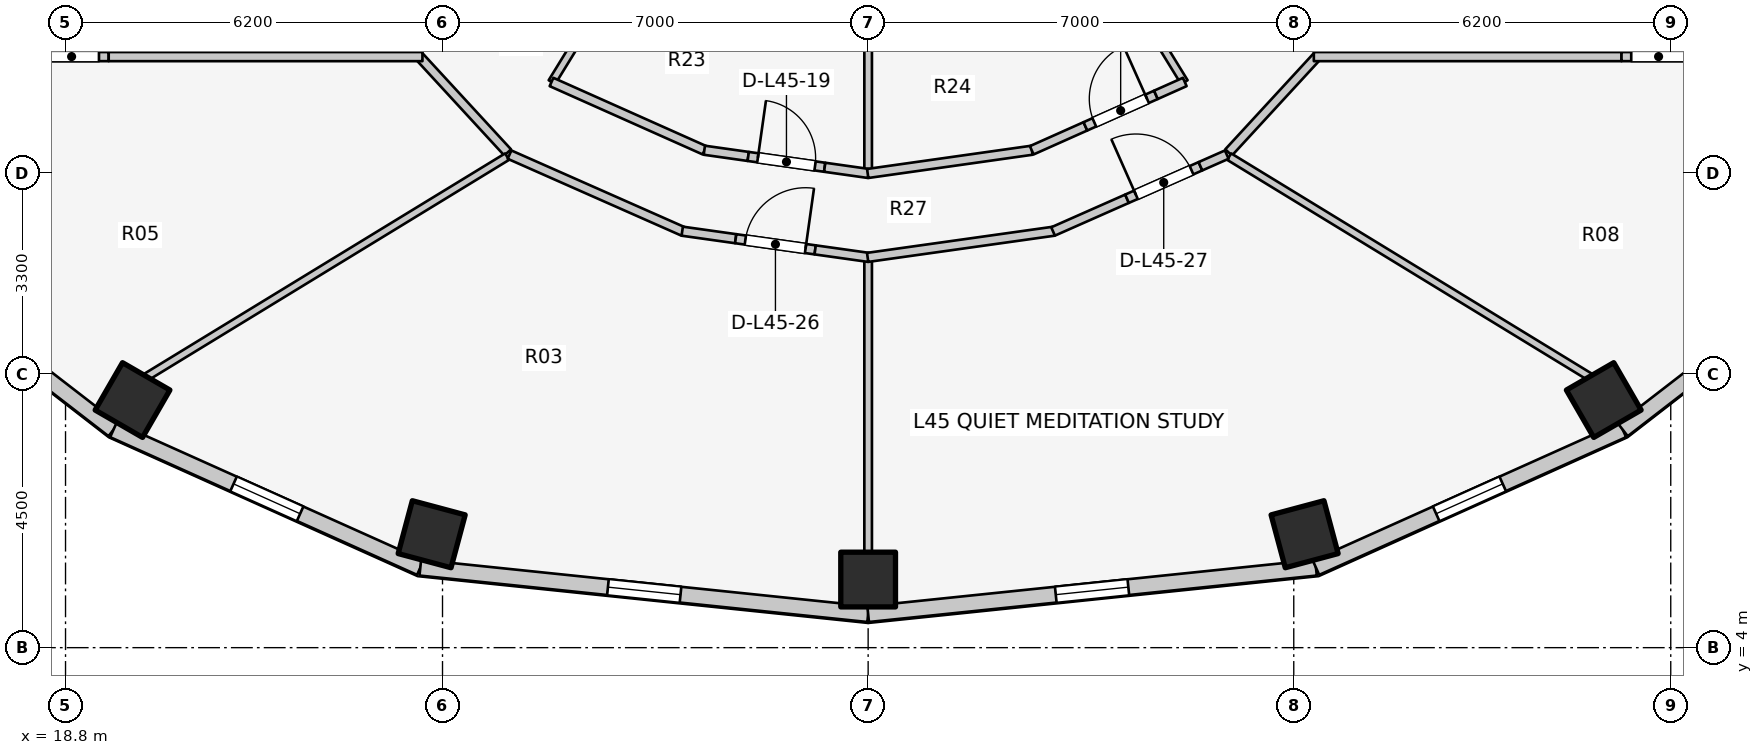
"""IFC4 building model, lengths in metres.
Left out: names, types, materials, properties, quantities, classifications, styles, units other than length and angle.
Written with IfcOpenShell. Run it as: python <this file> out.ifc"""

import sys

from ifc_helpers import new_model, si_unit, direction, frame, frame_2d, origin, origin_2d, place, context, subcontext, project, spatial, rectangle, extrude, element, fill, save


model = new_model("IFC4")
c1 = context("Model", 3, precision=1e-05, world=origin(), true_north=direction((0.0, 1.0)))
c2 = subcontext(c1, "Body", "Model", "MODEL_VIEW")
j1 = project(units=[si_unit("LENGTHUNIT", "METRE"), si_unit("PLANEANGLEUNIT", "RADIAN")], contexts=[c1])
p1 = place(None, origin())
s1 = spatial("IfcSite", under=j1, at=p1, CompositionType="ELEMENT")
p2 = place(p1, origin())
s2 = spatial("IfcBuilding", under=s1, at=p2, CompositionType="ELEMENT")
p3 = place(p2, frame((0.0, 0.0, 149.8)))
s3 = spatial("IfcBuildingStorey", under=s2, at=p3, CompositionType="ELEMENT", Elevation=149.8)
for number, where, z_axis, x_axis in (
    (1, (19.902, 8.072, 0.0), (0.0, 0.0, 1.0), (-0.5, -0.866, 0.0)),
    (2, (24.822, 5.865, 0.0), (0.0, 0.0, 1.0), (-0.259, -0.966, 0.0)),
    (3, (32.0, 5.12, 0.0), (0.0, 0.0, 1.0), (0.0, -1.0, 0.0)),
    (4, (39.178, 5.865, 0.0), (0.0, 0.0, 1.0), (0.259, -0.966, 0.0)),
    (5, (44.098, 8.072, 0.0), (0.0, 0.0, 1.0), (0.5, -0.866, 0.0)),
):
    element("IfcColumn", number, at=place(p3, frame(where, z_axis=z_axis, x_axis=x_axis)), inside=s3, PredefinedType="COLUMN", context=c2, shape_type="SweptSolid", body=[
        extrude(rectangle(XDim=0.9, YDim=0.9, at=origin_2d()), origin(), (0.0, 0.0, 1.0), 3.1),
    ])
p4 = place(p3, frame((15.731, 10.559, 0.0), z_axis=(0.0, 0.0, 1.0), x_axis=(0.791460185804, -0.611220724687, 0.0)))
e6 = element("IfcWall", 6, at=p4, inside=s3, PredefinedType="STANDARD", context=c2, shape_type="SweptSolid", body=[
    extrude(rectangle(XDim=4.872, YDim=0.26, at=frame_2d((2.436, 0.0))), origin(), (0.0, 0.0, 1.0), 1.22),
])
p5 = place(p3, frame((19.587, 7.581, 0.0), z_axis=(0.0, 0.0, 1.0), x_axis=(0.912353637112, -0.409403029847, 0.0)))
e7 = element("IfcWall", 7, at=p5, inside=s3, PredefinedType="STANDARD", context=c2, shape_type="SweptSolid", body=[
    extrude(rectangle(XDim=5.533, YDim=0.26, at=frame_2d((2.766, 0.0))), origin(), (0.0, 0.0, 1.0), 1.22),
])
p6 = place(p5, frame((2.167, 0.0, 0.15)))
e8 = element("IfcOpeningElement", 8, at=p6, cuts=e7, PredefinedType="OPENING", context=c2, shape_type="SweptSolid", body=[
    extrude(rectangle(XDim=1.2, YDim=0.9, at=frame_2d((0.6, 0.45))), frame((0.0, 0.14, 0.0), z_axis=(0.0, -1.0, 0.0), x_axis=(1.0, 0.0, 0.0)), (0.0, 0.0, 1.0), 0.28),
])
p7 = place(p3, frame((24.635, 5.315, 0.0), z_axis=(0.0, 0.0, 1.0), x_axis=(0.994664178965, -0.10316574569, 0.0)))
e9 = element("IfcWall", 9, at=p7, inside=s3, PredefinedType="STANDARD", context=c2, shape_type="SweptSolid", body=[
    extrude(rectangle(XDim=7.405, YDim=0.26, at=frame_2d((3.702, 0.0))), origin(), (0.0, 0.0, 1.0), 1.22),
])
p8 = place(p7, frame((3.102, 0.0, 0.15)))
e10 = element("IfcOpeningElement", 10, at=p8, cuts=e9, PredefinedType="OPENING", context=c2, shape_type="SweptSolid", body=[
    extrude(rectangle(XDim=1.2, YDim=0.9, at=frame_2d((0.6, 0.45))), frame((0.0, 0.14, 0.0), z_axis=(0.0, -1.0, 0.0), x_axis=(1.0, 0.0, 0.0)), (0.0, 0.0, 1.0), 0.28),
])
p9 = place(p3, frame((32.0, 4.552, 0.0), z_axis=(0.0, 0.0, 1.0), x_axis=(0.994664178965, 0.10316574569, 0.0)))
e11 = element("IfcWall", 11, at=p9, inside=s3, PredefinedType="STANDARD", context=c2, shape_type="SweptSolid", body=[
    extrude(rectangle(XDim=7.405, YDim=0.26, at=frame_2d((3.702, 0.0))), origin(), (0.0, 0.0, 1.0), 1.22),
])
p10 = place(p9, frame((3.102, 0.0, 0.15)))
e12 = element("IfcOpeningElement", 12, at=p10, cuts=e11, PredefinedType="OPENING", context=c2, shape_type="SweptSolid", body=[
    extrude(rectangle(XDim=1.2, YDim=0.9, at=frame_2d((0.6, 0.45))), frame((0.0, 0.14, 0.0), z_axis=(0.0, -1.0, 0.0), x_axis=(1.0, 0.0, 0.0)), (0.0, 0.0, 1.0), 0.28),
])
p11 = place(p3, frame((39.365, 5.315, 0.0), z_axis=(0.0, 0.0, 1.0), x_axis=(0.912353637112, 0.409403029847, 0.0)))
e13 = element("IfcWall", 13, at=p11, inside=s3, PredefinedType="STANDARD", context=c2, shape_type="SweptSolid", body=[
    extrude(rectangle(XDim=5.533, YDim=0.26, at=frame_2d((2.766, 0.0))), origin(), (0.0, 0.0, 1.0), 1.22),
])
p12 = place(p11, frame((2.167, 0.0, 0.15)))
e14 = element("IfcOpeningElement", 14, at=p12, cuts=e13, PredefinedType="OPENING", context=c2, shape_type="SweptSolid", body=[
    extrude(rectangle(XDim=1.2, YDim=0.9, at=frame_2d((0.6, 0.45))), frame((0.0, 0.14, 0.0), z_axis=(0.0, -1.0, 0.0), x_axis=(1.0, 0.0, 0.0)), (0.0, 0.0, 1.0), 0.28),
])
p13 = place(p3, frame((44.413, 7.581, 0.0), z_axis=(0.0, 0.0, 1.0), x_axis=(0.791460185804, 0.611220724687, 0.0)))
e15 = element("IfcWall", 15, at=p13, inside=s3, PredefinedType="STANDARD", context=c2, shape_type="SweptSolid", body=[
    extrude(rectangle(XDim=4.872, YDim=0.26, at=frame_2d((2.436, 0.0))), origin(), (0.0, 0.0, 1.0), 1.22),
])
p14 = place(p3, frame((26.072, 12.144, 0.0), z_axis=(0.0, 0.0, 1.0), x_axis=(-0.677579737957, 0.735449317567, 0.0)))
e16 = element("IfcWall", 16, at=p14, inside=s3, PredefinedType="PARTITIONING", context=c2, shape_type="SweptSolid", body=[
    extrude(rectangle(XDim=2.173, YDim=0.15, at=frame_2d((1.086, 0.0))), origin(), (0.0, 0.0, 1.0), 1.22),
])
p15 = place(p3, frame((18.29, 13.72, 0.0), z_axis=(0.0, 0.0, 1.0), x_axis=(1.0, 0.0, 0.0)))
e17 = element("IfcWall", 17, at=p15, inside=s3, PredefinedType="PARTITIONING", context=c2, shape_type="SweptSolid", body=[
    extrude(rectangle(XDim=1.22, YDim=0.15, at=frame_2d((0.61, 0.0))), origin(), (0.0, 0.0, 1.0), 2.575),
])
p16 = place(p15, frame((0.16, 0.0, 0.0)))
e18 = element("IfcOpeningElement", 18, at=p16, cuts=e17, PredefinedType="OPENING", context=c2, shape_type="SweptSolid", body=[
    extrude(rectangle(XDim=0.9, YDim=2.1, at=frame_2d((0.45, 1.05))), frame((0.0, 0.085, 0.0), z_axis=(0.0, -1.0, 0.0), x_axis=(1.0, 0.0, 0.0)), (0.0, 0.0, 1.0), 0.17),
])
p17 = place(p3, frame((19.51, 13.72, 0.0), z_axis=(0.0, 0.0, 1.0), x_axis=(1.0, 0.0, 0.0)))
e19 = element("IfcWall", 19, at=p17, inside=s3, PredefinedType="PARTITIONING", context=c2, shape_type="SweptSolid", body=[
    extrude(rectangle(XDim=5.16, YDim=0.15, at=frame_2d((2.58, 0.0))), origin(), (0.0, 0.0, 1.0), 1.22),
])
p18 = place(p3, frame((37.928, 12.144, 0.0), z_axis=(0.0, 0.0, 1.0), x_axis=(0.677579737957, 0.735449317567, 0.0)))
e20 = element("IfcWall", 20, at=p18, inside=s3, PredefinedType="PARTITIONING", context=c2, shape_type="SweptSolid", body=[
    extrude(rectangle(XDim=2.173, YDim=0.15, at=frame_2d((1.086, 0.0))), origin(), (0.0, 0.0, 1.0), 1.22),
])
p19 = place(p3, frame((39.33, 13.72, 0.0), z_axis=(0.0, 0.0, 1.0), x_axis=(1.0, 0.0, 0.0)))
e21 = element("IfcWall", 21, at=p19, inside=s3, PredefinedType="PARTITIONING", context=c2, shape_type="SweptSolid", body=[
    extrude(rectangle(XDim=5.06, YDim=0.15, at=frame_2d((2.53, 0.0))), origin(), (0.0, 0.0, 1.0), 1.22),
])
p20 = place(p3, frame((44.39, 13.72, 0.0), z_axis=(0.0, 0.0, 1.0), x_axis=(1.0, 0.0, 0.0)))
e22 = element("IfcWall", 22, at=p20, inside=s3, PredefinedType="PARTITIONING", context=c2, shape_type="SweptSolid", body=[
    extrude(rectangle(XDim=1.22, YDim=0.15, at=frame_2d((0.61, 0.0))), origin(), (0.0, 0.0, 1.0), 2.575),
])
p21 = place(p20, frame((0.16, 0.0, 0.0)))
e23 = element("IfcOpeningElement", 23, at=p21, cuts=e22, PredefinedType="OPENING", context=c2, shape_type="SweptSolid", body=[
    extrude(rectangle(XDim=0.9, YDim=2.1, at=frame_2d((0.45, 1.05))), frame((0.0, 0.085, 0.0), z_axis=(0.0, -1.0, 0.0), x_axis=(1.0, 0.0, 0.0)), (0.0, 0.0, 1.0), 0.17),
])
p22 = place(p3, frame((28.45, 15.985, 0.0), z_axis=(0.0, 0.0, 1.0), x_axis=(-0.523587550846, -0.851971875474, 0.0)))
e24 = element("IfcWall", 24, at=p22, inside=s3, PredefinedType="PARTITIONING", context=c2, shape_type="SweptSolid", body=[
    extrude(rectangle(XDim=3.153, YDim=0.125, at=frame_2d((1.577, 0.0))), origin(), (0.0, 0.0, 1.0), 1.22),
])
p23 = place(p3, frame((32.0, 14.9, 0.0), z_axis=(0.0, 0.0, 1.0), x_axis=(0.0, -1.0, 0.0)))
e25 = element("IfcWall", 25, at=p23, inside=s3, PredefinedType="PARTITIONING", context=c2, shape_type="SweptSolid", body=[
    extrude(rectangle(XDim=3.102, YDim=0.125, at=frame_2d((1.551, 0.0))), origin(), (0.0, 0.0, 1.0), 1.22),
])
p24 = place(p3, frame((35.55, 15.985, 0.0), z_axis=(0.0, 0.0, 1.0), x_axis=(0.523587550846, -0.851971875474, 0.0)))
e26 = element("IfcWall", 26, at=p24, inside=s3, PredefinedType="PARTITIONING", context=c2, shape_type="SweptSolid", body=[
    extrude(rectangle(XDim=3.153, YDim=0.125, at=frame_2d((1.577, 0.0))), origin(), (0.0, 0.0, 1.0), 1.22),
])
p25 = place(p3, frame((26.793, 13.303, 0.0), z_axis=(0.0, 0.0, 1.0), x_axis=(0.913145536541, -0.407633694749, 0.0)))
e27 = element("IfcWall", 27, at=p25, inside=s3, PredefinedType="PARTITIONING", context=c2, shape_type="SweptSolid", body=[
    extrude(rectangle(XDim=2.756, YDim=0.15, at=frame_2d((1.378, 0.0))), origin(), (0.0, 0.0, 1.0), 1.22),
])
p26 = place(p3, frame((29.306, 12.18, 0.0), z_axis=(0.0, 0.0, 1.0), x_axis=(0.990156034925, -0.139967948123, 0.0)))
e28 = element("IfcWall", 28, at=p26, inside=s3, PredefinedType="PARTITIONING", context=c2, shape_type="SweptSolid", body=[
    extrude(rectangle(XDim=0.729, YDim=0.15, at=frame_2d((0.365, 0.0))), origin(), (0.0, 0.0, 1.0), 2.575),
])
p27 = place(p3, frame((30.028, 12.078, 0.0), z_axis=(0.0, 0.0, 1.0), x_axis=(0.990133183593, -0.140129507055, 0.0)))
e29 = element("IfcWall", 29, at=p27, inside=s3, PredefinedType="PARTITIONING", context=c2, shape_type="SweptSolid", body=[
    extrude(rectangle(XDim=1.27, YDim=0.15, at=frame_2d((0.635, 0.0))), origin(), (0.0, 0.0, 1.0), 2.575),
])
p28 = place(p27, frame((0.16, 0.0, 0.0)))
e30 = element("IfcOpeningElement", 30, at=p28, cuts=e29, PredefinedType="OPENING", context=c2, shape_type="SweptSolid", body=[
    extrude(rectangle(XDim=0.95, YDim=2.1, at=frame_2d((0.475, 1.05))), frame((0.0, 0.085, 0.0), z_axis=(0.0, -1.0, 0.0), x_axis=(1.0, 0.0, 0.0)), (0.0, 0.0, 1.0), 0.17),
])
p29 = place(p3, frame((31.285, 11.9, 0.0), z_axis=(0.0, 0.0, 1.0), x_axis=(0.990156034925, -0.139967948123, 0.0)))
e31 = element("IfcWall", 31, at=p29, inside=s3, PredefinedType="PARTITIONING", context=c2, shape_type="SweptSolid", body=[
    extrude(rectangle(XDim=0.729, YDim=0.15, at=frame_2d((0.365, 0.0))), origin(), (0.0, 0.0, 1.0), 1.22),
])
p30 = place(p3, frame((31.993, 11.798, 0.0), z_axis=(0.0, 0.0, 1.0), x_axis=(0.990145400278, 0.140043158738, 0.0)))
e32 = element("IfcWall", 32, at=p30, inside=s3, PredefinedType="PARTITIONING", context=c2, shape_type="SweptSolid", body=[
    extrude(rectangle(XDim=2.728, YDim=0.15, at=frame_2d((1.364, 0.0))), origin(), (0.0, 0.0, 1.0), 1.22),
])
p31 = place(p3, frame((34.69, 12.179, 0.0), z_axis=(0.0, 0.0, 1.0), x_axis=(0.913164738684, 0.407590677057, 0.0)))
e33 = element("IfcWall", 33, at=p31, inside=s3, PredefinedType="PARTITIONING", context=c2, shape_type="SweptSolid", body=[
    extrude(rectangle(XDim=0.967, YDim=0.15, at=frame_2d((0.483, 0.0))), origin(), (0.0, 0.0, 1.0), 1.22),
])
p32 = place(p3, frame((35.573, 12.573, 0.0), z_axis=(0.0, 0.0, 1.0), x_axis=(0.913104656548, 0.407725258219, 0.0)))
e34 = element("IfcWall", 34, at=p32, inside=s3, PredefinedType="PARTITIONING", context=c2, shape_type="SweptSolid", body=[
    extrude(rectangle(XDim=1.27, YDim=0.15, at=frame_2d((0.635, 0.0))), origin(), (0.0, 0.0, 1.0), 2.16),
])
p33 = place(p32, frame((0.16, 0.0, 0.0)))
e35 = element("IfcOpeningElement", 35, at=p33, cuts=e34, PredefinedType="OPENING", context=c2, shape_type="SweptSolid", body=[
    extrude(rectangle(XDim=0.95, YDim=2.1, at=frame_2d((0.475, 1.05))), frame((0.0, 0.085, 0.0), z_axis=(0.0, -1.0, 0.0), x_axis=(1.0, 0.0, 0.0)), (0.0, 0.0, 1.0), 0.17),
])
p34 = place(p3, frame((36.733, 13.091, 0.0), z_axis=(0.0, 0.0, 1.0), x_axis=(0.913209724119, 0.407489876897, 0.0)))
e36 = element("IfcWall", 36, at=p34, inside=s3, PredefinedType="PARTITIONING", context=c2, shape_type="SweptSolid", body=[
    extrude(rectangle(XDim=0.52, YDim=0.15, at=frame_2d((0.26, 0.0))), origin(), (0.0, 0.0, 1.0), 2.575),
])
p35 = place(p3, frame((26.062, 12.075, 0.0), z_axis=(0.0, 0.0, 1.0), x_axis=(-0.853440334679, -0.521190555501, 0.0)))
e37 = element("IfcWall", 37, at=p35, inside=s3, PredefinedType="PARTITIONING", context=c2, shape_type="SweptSolid", body=[
    extrude(rectangle(XDim=6.966, YDim=0.125, at=frame_2d((3.483, 0.0))), origin(), (0.0, 0.0, 1.0), 1.22),
])
p36 = place(p3, frame((32.0, 10.363, 0.0), z_axis=(0.0, 0.0, 1.0), x_axis=(0.0, -1.0, 0.0)))
e38 = element("IfcWall", 38, at=p36, inside=s3, PredefinedType="PARTITIONING", context=c2, shape_type="SweptSolid", body=[
    extrude(rectangle(XDim=4.813, YDim=0.125, at=frame_2d((2.406, 0.0))), origin(), (0.0, 0.0, 1.0), 1.22),
])
p37 = place(p3, frame((37.938, 12.075, 0.0), z_axis=(0.0, 0.0, 1.0), x_axis=(0.853440334679, -0.521190555501, 0.0)))
e39 = element("IfcWall", 39, at=p37, inside=s3, PredefinedType="PARTITIONING", context=c2, shape_type="SweptSolid", body=[
    extrude(rectangle(XDim=6.966, YDim=0.125, at=frame_2d((3.483, 0.0))), origin(), (0.0, 0.0, 1.0), 1.22),
])
p38 = place(p3, frame((26.102, 12.108, 0.0), z_axis=(0.0, 0.0, 1.0), x_axis=(0.914519212393, -0.40454247016, 0.0)))
e40 = element("IfcWall", 40, at=p38, inside=s3, PredefinedType="PARTITIONING", context=c2, shape_type="SweptSolid", body=[
    extrude(rectangle(XDim=3.124, YDim=0.15, at=frame_2d((1.562, 0.0))), origin(), (0.0, 0.0, 1.0), 1.22),
])
p39 = place(p3, frame((28.943, 10.849, 0.0), z_axis=(0.0, 0.0, 1.0), x_axis=(0.990238800444, -0.139381197064, 0.0)))
e41 = element("IfcWall", 41, at=p39, inside=s3, PredefinedType="PARTITIONING", context=c2, shape_type="SweptSolid", body=[
    extrude(rectangle(XDim=0.888, YDim=0.15, at=frame_2d((0.444, 0.0))), origin(), (0.0, 0.0, 1.0), 2.575),
])
p40 = place(p3, frame((29.822, 10.725, 0.0), z_axis=(0.0, 0.0, 1.0), x_axis=(0.990250599082, -0.139297347489, 0.0)))
e42 = element("IfcWall", 42, at=p40, inside=s3, PredefinedType="PARTITIONING", context=c2, shape_type="SweptSolid", body=[
    extrude(rectangle(XDim=1.32, YDim=0.15, at=frame_2d((0.66, 0.0))), origin(), (0.0, 0.0, 1.0), 2.575),
])
p41 = place(p40, frame((0.16, 0.0, 0.0)))
e43 = element("IfcOpeningElement", 43, at=p41, cuts=e42, PredefinedType="OPENING", context=c2, shape_type="SweptSolid", body=[
    extrude(rectangle(XDim=1.0, YDim=2.1, at=frame_2d((0.5, 1.05))), frame((0.0, 0.085, 0.0), z_axis=(0.0, -1.0, 0.0), x_axis=(1.0, 0.0, 0.0)), (0.0, 0.0, 1.0), 0.17),
])
p42 = place(p3, frame((31.129, 10.542, 0.0), z_axis=(0.0, 0.0, 1.0), x_axis=(0.990276708961, -0.139111608755, 0.0)))
e44 = element("IfcWall", 44, at=p42, inside=s3, PredefinedType="PARTITIONING", context=c2, shape_type="SweptSolid", body=[
    extrude(rectangle(XDim=0.888, YDim=0.15, at=frame_2d((0.444, 0.0))), origin(), (0.0, 0.0, 1.0), 1.22),
])
p43 = place(p3, frame((31.992, 10.418, 0.0), z_axis=(0.0, 0.0, 1.0), x_axis=(0.990254709652, 0.13926812274, 0.0)))
e45 = element("IfcWall", 45, at=p43, inside=s3, PredefinedType="PARTITIONING", context=c2, shape_type="SweptSolid", body=[
    extrude(rectangle(XDim=3.096, YDim=0.15, at=frame_2d((1.548, 0.0))), origin(), (0.0, 0.0, 1.0), 1.22),
])
p44 = place(p3, frame((35.042, 10.844, 0.0), z_axis=(0.0, 0.0, 1.0), x_axis=(0.91450660596, 0.40457096739, 0.0)))
e46 = element("IfcWall", 46, at=p44, inside=s3, PredefinedType="PARTITIONING", context=c2, shape_type="SweptSolid", body=[
    extrude(rectangle(XDim=1.33, YDim=0.15, at=frame_2d((0.665, 0.0))), origin(), (0.0, 0.0, 1.0), 1.22),
])
p45 = place(p3, frame((36.258, 11.383, 0.0), z_axis=(0.0, 0.0, 1.0), x_axis=(0.914519545761, 0.404541716541, 0.0)))
e47 = element("IfcWall", 47, at=p45, inside=s3, PredefinedType="PARTITIONING", context=c2, shape_type="SweptSolid", body=[
    extrude(rectangle(XDim=1.32, YDim=0.15, at=frame_2d((0.66, 0.0))), origin(), (0.0, 0.0, 1.0), 2.16),
])
p46 = place(p45, frame((0.16, 0.0, 0.0)))
e48 = element("IfcOpeningElement", 48, at=p46, cuts=e47, PredefinedType="OPENING", context=c2, shape_type="SweptSolid", body=[
    extrude(rectangle(XDim=1.0, YDim=2.1, at=frame_2d((0.5, 1.05))), frame((0.0, 0.085, 0.0), z_axis=(0.0, -1.0, 0.0), x_axis=(1.0, 0.0, 0.0)), (0.0, 0.0, 1.0), 0.17),
])
p47 = place(p3, frame((37.465, 11.917, 0.0), z_axis=(0.0, 0.0, 1.0), x_axis=(0.914553664309, 0.4044645783, 0.0)))
e49 = element("IfcWall", 49, at=p47, inside=s3, PredefinedType="PARTITIONING", context=c2, shape_type="SweptSolid", body=[
    extrude(rectangle(XDim=0.474, YDim=0.15, at=frame_2d((0.237, 0.0))), origin(), (0.0, 0.0, 1.0), 2.575),
])
p48 = place(p6, origin())
e50 = element("IfcWindow", 50, at=p48, inside=s3, PartitioningType="SINGLE_PANEL", PredefinedType="WINDOW", context=c2, shape_type="SweptSolid", body=[
    extrude(rectangle(XDim=1.2, YDim=0.9, at=frame_2d((0.6, 0.45))), frame((0.0, 0.03, 0.0), z_axis=(0.0, -1.0, 0.0), x_axis=(1.0, 0.0, 0.0)), (0.0, 0.0, 1.0), 0.06),
])
fill(e8, e50)
p49 = place(p8, origin())
e51 = element("IfcWindow", 51, at=p49, inside=s3, PartitioningType="SINGLE_PANEL", PredefinedType="WINDOW", context=c2, shape_type="SweptSolid", body=[
    extrude(rectangle(XDim=1.2, YDim=0.9, at=frame_2d((0.6, 0.45))), frame((0.0, 0.03, 0.0), z_axis=(0.0, -1.0, 0.0), x_axis=(1.0, 0.0, 0.0)), (0.0, 0.0, 1.0), 0.06),
])
fill(e10, e51)
p50 = place(p10, origin())
e52 = element("IfcWindow", 52, at=p50, inside=s3, PartitioningType="SINGLE_PANEL", PredefinedType="WINDOW", context=c2, shape_type="SweptSolid", body=[
    extrude(rectangle(XDim=1.2, YDim=0.9, at=frame_2d((0.6, 0.45))), frame((0.0, 0.03, 0.0), z_axis=(0.0, -1.0, 0.0), x_axis=(1.0, 0.0, 0.0)), (0.0, 0.0, 1.0), 0.06),
])
fill(e12, e52)
p51 = place(p12, origin())
e53 = element("IfcWindow", 53, at=p51, inside=s3, PartitioningType="SINGLE_PANEL", PredefinedType="WINDOW", context=c2, shape_type="SweptSolid", body=[
    extrude(rectangle(XDim=1.2, YDim=0.9, at=frame_2d((0.6, 0.45))), frame((0.0, 0.03, 0.0), z_axis=(0.0, -1.0, 0.0), x_axis=(1.0, 0.0, 0.0)), (0.0, 0.0, 1.0), 0.06),
])
fill(e14, e53)
p52 = place(p16, origin())
e54 = element("IfcDoor", 54, at=p52, inside=s3, OperationType="SINGLE_SWING_LEFT", PredefinedType="DOOR", context=c2, shape_type="SweptSolid", body=[
    extrude(rectangle(XDim=0.9, YDim=2.1, at=frame_2d((0.45, 1.05))), frame((0.0, 0.025, 0.0), z_axis=(0.0, -1.0, 0.0), x_axis=(1.0, 0.0, 0.0)), (0.0, 0.0, 1.0), 0.05),
])
fill(e18, e54)
p53 = place(p21, origin())
e55 = element("IfcDoor", 55, at=p53, inside=s3, OperationType="SINGLE_SWING_RIGHT", PredefinedType="DOOR", context=c2, shape_type="SweptSolid", body=[
    extrude(rectangle(XDim=0.9, YDim=2.1, at=frame_2d((0.45, 1.05))), frame((0.0, 0.025, 0.0), z_axis=(0.0, -1.0, 0.0), x_axis=(1.0, 0.0, 0.0)), (0.0, 0.0, 1.0), 0.05),
])
fill(e23, e55)
p54 = place(p28, origin())
e56 = element("IfcDoor", 56, at=p54, inside=s3, OperationType="SINGLE_SWING_LEFT", PredefinedType="DOOR", context=c2, shape_type="SweptSolid", body=[
    extrude(rectangle(XDim=0.95, YDim=2.1, at=frame_2d((0.475, 1.05))), frame((0.0, 0.025, 0.0), z_axis=(0.0, -1.0, 0.0), x_axis=(1.0, 0.0, 0.0)), (0.0, 0.0, 1.0), 0.05),
])
fill(e30, e56)
p55 = place(p33, origin())
e57 = element("IfcDoor", 57, at=p55, inside=s3, OperationType="SINGLE_SWING_RIGHT", PredefinedType="DOOR", context=c2, shape_type="SweptSolid", body=[
    extrude(rectangle(XDim=0.95, YDim=2.1, at=frame_2d((0.475, 1.05))), frame((0.0, 0.025, 0.0), z_axis=(0.0, -1.0, 0.0), x_axis=(1.0, 0.0, 0.0)), (0.0, 0.0, 1.0), 0.05),
])
fill(e35, e57)
p56 = place(p41, origin())
e58 = element("IfcDoor", 58, at=p56, inside=s3, OperationType="SINGLE_SWING_RIGHT", PredefinedType="DOOR", context=c2, shape_type="SweptSolid", body=[
    extrude(rectangle(XDim=1.0, YDim=2.1, at=frame_2d((0.5, 1.05))), frame((0.0, 0.025, 0.0), z_axis=(0.0, -1.0, 0.0), x_axis=(1.0, 0.0, 0.0)), (0.0, 0.0, 1.0), 0.05),
])
fill(e43, e58)
p57 = place(p46, origin())
e59 = element("IfcDoor", 59, at=p57, inside=s3, OperationType="SINGLE_SWING_LEFT", PredefinedType="DOOR", context=c2, shape_type="SweptSolid", body=[
    extrude(rectangle(XDim=1.0, YDim=2.1, at=frame_2d((0.5, 1.05))), frame((0.0, 0.025, 0.0), z_axis=(0.0, -1.0, 0.0), x_axis=(1.0, 0.0, 0.0)), (0.0, 0.0, 1.0), 0.05),
])
fill(e48, e59)
save(model, sys.argv[1])
